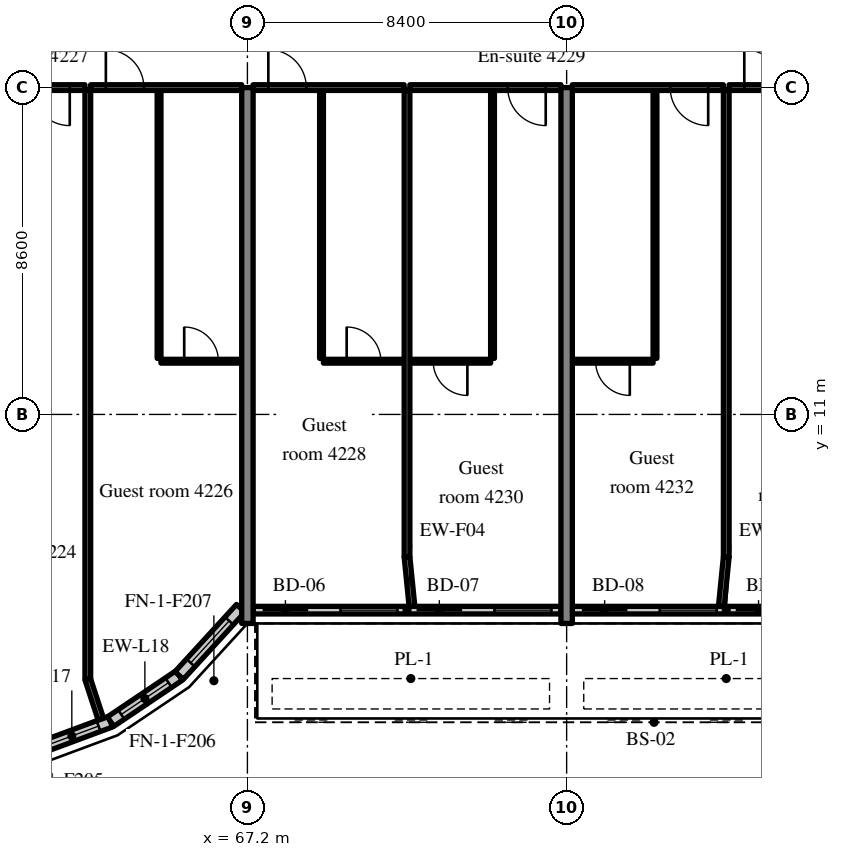
"""IFC4 building model, lengths in metres.
Left out: names, types, materials, properties, quantities, classifications, styles, units other than length and angle.
Written with IfcOpenShell. Run it as: python <this file> out.ifc"""

import sys

from ifc_helpers import new_model, si_unit, direction, frame, frame_2d, origin, place, context, subcontext, project, spatial, rectangle, extrude, source, transform, mapped, element, fill, save


model = new_model("IFC4")
c1 = context("Model", 3, precision=1e-05, world=origin(), true_north=direction((0.0, 1.0)))
c2 = subcontext(c1, "Body", "Model", "MODEL_VIEW")
j1 = project(units=[si_unit("LENGTHUNIT", "METRE"), si_unit("PLANEANGLEUNIT", "RADIAN")], contexts=[c1])
p1 = place(None, origin())
s1 = spatial("IfcSite", under=j1, at=p1, CompositionType="ELEMENT")
p2 = place(p1, origin())
s2 = spatial("IfcBuilding", under=s1, at=p2, CompositionType="ELEMENT")
p3 = place(p2, frame((0.0, 0.0, 174.4)))
s3 = spatial("IfcBuildingStorey", under=s2, at=p3, CompositionType="ELEMENT", Elevation=174.4)
m1 = source(origin(), c2, "Body", "SweptSolid", [
    extrude(rectangle(XDim=14.1, YDim=0.3, at=frame_2d((7.05, 0.0))), origin(), (0.0, 0.0, 1.0), 3.52),
])
for number, where, z_axis, x_axis in (
    (1, (67.2, 5.5, 0.0), (0.0, 0.0, 1.0), (0.0, 1.0, 0.0)),
    (2, (75.6, 5.5, 0.0), (0.0, 0.0, 1.0), (0.0, 1.0, 0.0)),
):
    element("IfcWall", number, at=place(p3, frame(where, z_axis=z_axis, x_axis=x_axis)), inside=s3, PredefinedType="SHEAR", context=c2, shape_type="MappedRepresentation", body=[
        mapped(m1, transform((0.0, 0.0, 0.0), scale=1.0)),
    ])
m2 = source(origin(), c2, "Body", "SweptSolid", [
    extrude(rectangle(XDim=2.176, YDim=0.3, at=frame_2d((1.088, 0.0))), origin(), (0.0, 0.0, 1.0), 3.52),
])
p4 = place(p3, frame((61.56, 2.16, 0.0), z_axis=(0.0, 0.0, 1.0), x_axis=(0.937531979054, 0.347899106424, 0.0)))
e3 = element("IfcWall", 3, at=p4, inside=s3, PredefinedType="SOLIDWALL", context=c2, shape_type="MappedRepresentation", body=[
    mapped(m2, transform((0.0, 0.0, 0.0), scale=1.0)),
])
m3 = source(origin(), c2, "Body", "SweptSolid", [
    extrude(rectangle(XDim=1.5, YDim=2.0, at=frame_2d((0.75, 1.0))), frame((0.0, 0.16, 0.0), z_axis=(0.0, -1.0, 0.0), x_axis=(1.0, 0.0, 0.0)), (0.0, 0.0, 1.0), 0.32),
])
p5 = place(p4, frame((0.338, 0.0, 0.9)))
e4 = element("IfcOpeningElement", 4, at=p5, cuts=e3, PredefinedType="OPENING", context=c2, shape_type="MappedRepresentation", body=[
    mapped(m3, transform((0.0, 0.0, 0.0), scale=1.0)),
])
m4 = source(origin(), c2, "Body", "SweptSolid", [
    extrude(rectangle(XDim=2.176, YDim=0.3, at=frame_2d((1.088, 0.0))), origin(), (0.0, 0.0, 1.0), 3.52),
])
p6 = place(p3, frame((63.599, 2.917, 0.0), z_axis=(0.0, 0.0, 1.0), x_axis=(0.829625727223, 0.558319937607, 0.0)))
e5 = element("IfcWall", 5, at=p6, inside=s3, PredefinedType="SOLIDWALL", context=c2, shape_type="MappedRepresentation", body=[
    mapped(m4, transform((0.0, 0.0, 0.0), scale=1.0)),
])
p7 = place(p6, frame((0.338, 0.0, 0.9)))
e6 = element("IfcOpeningElement", 6, at=p7, cuts=e5, PredefinedType="OPENING", context=c2, shape_type="MappedRepresentation", body=[
    mapped(m3, transform((0.0, 0.0, 0.0), scale=1.0)),
])
m5 = source(origin(), c2, "Body", "SweptSolid", [
    extrude(rectangle(XDim=2.398, YDim=0.3, at=frame_2d((1.199, 0.0))), origin(), (0.0, 0.0, 1.0), 3.52),
])
p8 = place(p3, frame((65.404, 4.131, 0.0), z_axis=(0.0, 0.0, 1.0), x_axis=(0.675374189419, 0.737475222815, 0.0)))
e7 = element("IfcWall", 7, at=p8, inside=s3, PredefinedType="SOLIDWALL", context=c2, shape_type="MappedRepresentation", body=[
    mapped(m5, transform((0.0, 0.0, 0.0), scale=1.0)),
])
p9 = place(p8, frame((0.449, 0.0, 0.9)))
e8 = element("IfcOpeningElement", 8, at=p9, cuts=e7, PredefinedType="OPENING", context=c2, shape_type="MappedRepresentation", body=[
    mapped(m3, transform((0.0, 0.0, 0.0), scale=1.0)),
])
m6 = source(origin(), c2, "Body", "SweptSolid", [
    extrude(rectangle(XDim=8.1, YDim=0.2, at=frame_2d((4.05, 0.0))), origin(), (0.0, 0.0, 1.0), 2.87),
])
p10 = place(p3, frame((67.35, 5.85, 0.0), z_axis=(0.0, 0.0, 1.0), x_axis=(1.0, 0.0, 0.0)))
e9 = element("IfcWall", 9, at=p10, inside=s3, PredefinedType="SOLIDWALL", context=c2, shape_type="MappedRepresentation", body=[
    mapped(m6, transform((0.0, 0.0, 0.0), scale=1.0)),
])
m7 = source(origin(), c2, "Body", "SweptSolid", [
    extrude(rectangle(XDim=1.2, YDim=2.4, at=frame_2d((0.6, 1.2))), frame((0.0, 0.11, 0.0), z_axis=(0.0, -1.0, 0.0), x_axis=(1.0, 0.0, 0.0)), (0.0, 0.0, 1.0), 0.22),
])
p11 = place(p10, frame((0.25, 0.0, 0.0)))
e10 = element("IfcOpeningElement", 10, at=p11, cuts=e9, PredefinedType="OPENING", context=c2, shape_type="MappedRepresentation", body=[
    mapped(m7, transform((0.0, 0.0, 0.0), scale=1.0)),
])
m8 = source(origin(), c2, "Body", "SweptSolid", [
    extrude(rectangle(XDim=1.5, YDim=1.5, at=frame_2d((0.75, 0.75))), frame((0.0, 0.11, 0.0), z_axis=(0.0, -1.0, 0.0), x_axis=(1.0, 0.0, 0.0)), (0.0, 0.0, 1.0), 0.22),
])
p12 = place(p10, frame((2.3, 0.0, 0.9)))
e11 = element("IfcOpeningElement", 11, at=p12, cuts=e9, PredefinedType="OPENING", context=c2, shape_type="MappedRepresentation", body=[
    mapped(m8, transform((0.0, 0.0, 0.0), scale=1.0)),
])
p13 = place(p10, frame((4.3, 0.0, 0.0)))
e12 = element("IfcOpeningElement", 12, at=p13, cuts=e9, PredefinedType="OPENING", context=c2, shape_type="MappedRepresentation", body=[
    mapped(m7, transform((0.0, 0.0, 0.0), scale=1.0)),
])
p14 = place(p10, frame((6.35, 0.0, 0.9)))
e13 = element("IfcOpeningElement", 13, at=p14, cuts=e9, PredefinedType="OPENING", context=c2, shape_type="MappedRepresentation", body=[
    mapped(m8, transform((0.0, 0.0, 0.0), scale=1.0)),
])
m9 = source(origin(), c2, "Body", "SweptSolid", [
    extrude(rectangle(XDim=8.1, YDim=0.2, at=frame_2d((4.05, 0.0))), origin(), (0.0, 0.0, 1.0), 2.87),
])
p15 = place(p3, frame((75.75, 5.85, 0.0), z_axis=(0.0, 0.0, 1.0), x_axis=(1.0, 0.0, 0.0)))
e14 = element("IfcWall", 14, at=p15, inside=s3, PredefinedType="SOLIDWALL", context=c2, shape_type="MappedRepresentation", body=[
    mapped(m9, transform((0.0, 0.0, 0.0), scale=1.0)),
])
p16 = place(p15, frame((0.25, 0.0, 0.0)))
e15 = element("IfcOpeningElement", 15, at=p16, cuts=e14, PredefinedType="OPENING", context=c2, shape_type="MappedRepresentation", body=[
    mapped(m7, transform((0.0, 0.0, 0.0), scale=1.0)),
])
p17 = place(p15, frame((2.3, 0.0, 0.9)))
e16 = element("IfcOpeningElement", 16, at=p17, cuts=e14, PredefinedType="OPENING", context=c2, shape_type="MappedRepresentation", body=[
    mapped(m8, transform((0.0, 0.0, 0.0), scale=1.0)),
])
p18 = place(p15, frame((4.3, 0.0, 0.0)))
e17 = element("IfcOpeningElement", 17, at=p18, cuts=e14, PredefinedType="OPENING", context=c2, shape_type="MappedRepresentation", body=[
    mapped(m7, transform((0.0, 0.0, 0.0), scale=1.0)),
])
p19 = place(p15, frame((6.35, 0.0, 0.9)))
e18 = element("IfcOpeningElement", 18, at=p19, cuts=e14, PredefinedType="OPENING", context=c2, shape_type="MappedRepresentation", body=[
    mapped(m8, transform((0.0, 0.0, 0.0), scale=1.0)),
])
m10 = source(origin(), c2, "Body", "SweptSolid", [
    extrude(rectangle(XDim=3.975, YDim=0.15, at=frame_2d((1.988, 0.0))), origin(), (0.0, 0.0, 1.0), 2.82),
])
p20 = place(p3, frame((58.95, 19.6, 0.0), z_axis=(0.0, 0.0, 1.0), x_axis=(1.0, 0.0, 0.0)))
e19 = element("IfcWall", 19, at=p20, inside=s3, PredefinedType="PARTITIONING", context=c2, shape_type="MappedRepresentation", body=[
    mapped(m10, transform((0.0, 0.0, 0.0), scale=1.0)),
])
m11 = source(origin(), c2, "Body", "SweptSolid", [
    extrude(rectangle(XDim=1.0, YDim=2.1, at=frame_2d((0.5, 1.05))), frame((0.0, 0.085, 0.0), z_axis=(0.0, -1.0, 0.0), x_axis=(1.0, 0.0, 0.0)), (0.0, 0.0, 1.0), 0.17),
])
p21 = place(p20, frame((2.575, 0.0, 0.0)))
e20 = element("IfcOpeningElement", 20, at=p21, cuts=e19, PredefinedType="OPENING", context=c2, shape_type="MappedRepresentation", body=[
    mapped(m11, transform((0.0, 0.0, 0.0), scale=1.0)),
])
m12 = source(origin(), c2, "Body", "SweptSolid", [
    extrude(rectangle(XDim=7.05, YDim=0.1, at=frame_2d((3.525, 0.0))), origin(), (0.0, 0.0, 1.0), 3.52),
])
p22 = place(p3, frame((64.875, 12.475, 0.0), z_axis=(0.0, 0.0, 1.0), x_axis=(0.0, 1.0, 0.0)))
e21 = element("IfcWall", 21, at=p22, inside=s3, PredefinedType="PARTITIONING", context=c2, shape_type="MappedRepresentation", body=[
    mapped(m12, transform((0.0, 0.0, 0.0), scale=1.0)),
])
m13 = source(origin(), c2, "Body", "SweptSolid", [
    extrude(rectangle(XDim=2.125, YDim=0.1, at=frame_2d((1.062, 0.0))), origin(), (0.0, 0.0, 1.0), 3.52),
])
p23 = place(p3, frame((64.925, 12.4, 0.0), z_axis=(0.0, 0.0, 1.0), x_axis=(1.0, 0.0, 0.0)))
e22 = element("IfcWall", 22, at=p23, inside=s3, PredefinedType="PARTITIONING", context=c2, shape_type="MappedRepresentation", body=[
    mapped(m13, transform((0.0, 0.0, 0.0), scale=1.0)),
])
m14 = source(origin(), c2, "Body", "SweptSolid", [
    extrude(rectangle(XDim=0.9, YDim=2.1, at=frame_2d((0.45, 1.05))), frame((0.0, 0.06, 0.0), z_axis=(0.0, -1.0, 0.0), x_axis=(1.0, 0.0, 0.0)), (0.0, 0.0, 1.0), 0.12),
])
p24 = place(p23, frame((0.612, 0.0, 0.0)))
e23 = element("IfcOpeningElement", 23, at=p24, cuts=e22, PredefinedType="OPENING", context=c2, shape_type="MappedRepresentation", body=[
    mapped(m14, transform((0.0, 0.0, 0.0), scale=1.0)),
])
p25 = place(p3, frame((63.075, 19.6, 0.0), z_axis=(0.0, 0.0, 1.0), x_axis=(1.0, 0.0, 0.0)))
e24 = element("IfcWall", 24, at=p25, inside=s3, PredefinedType="PARTITIONING", context=c2, shape_type="MappedRepresentation", body=[
    mapped(m10, transform((0.0, 0.0, 0.0), scale=1.0)),
])
p26 = place(p25, frame((0.4, 0.0, 0.0)))
e25 = element("IfcOpeningElement", 25, at=p26, cuts=e24, PredefinedType="OPENING", context=c2, shape_type="MappedRepresentation", body=[
    mapped(m11, transform((0.0, 0.0, 0.0), scale=1.0)),
])
m15 = source(origin(), c2, "Body", "SweptSolid", [
    extrude(rectangle(XDim=15.498, YDim=0.15, at=frame_2d((7.749, 0.0))), origin(), (0.0, 0.0, 1.0), 3.52),
])
p27 = place(p3, frame((63.0, 4.027, 0.0), z_axis=(0.0, 0.0, 1.0), x_axis=(0.0, 1.0, 0.0)))
e26 = element("IfcWall", 26, at=p27, inside=s3, PredefinedType="PARTITIONING", context=c2, shape_type="MappedRepresentation", body=[
    mapped(m15, transform((0.0, 0.0, 0.0), scale=1.0)),
])
p28 = place(p3, frame((69.15, 12.475, 0.0), z_axis=(0.0, 0.0, 1.0), x_axis=(0.0, 1.0, 0.0)))
e27 = element("IfcWall", 27, at=p28, inside=s3, PredefinedType="PARTITIONING", context=c2, shape_type="MappedRepresentation", body=[
    mapped(m12, transform((0.0, 0.0, 0.0), scale=1.0)),
])
p29 = place(p3, frame((69.2, 12.4, 0.0), z_axis=(0.0, 0.0, 1.0), x_axis=(1.0, 0.0, 0.0)))
e28 = element("IfcWall", 28, at=p29, inside=s3, PredefinedType="PARTITIONING", context=c2, shape_type="MappedRepresentation", body=[
    mapped(m13, transform((0.0, 0.0, 0.0), scale=1.0)),
])
p30 = place(p29, frame((0.612, 0.0, 0.0)))
e29 = element("IfcOpeningElement", 29, at=p30, cuts=e28, PredefinedType="OPENING", context=c2, shape_type="MappedRepresentation", body=[
    mapped(m14, transform((0.0, 0.0, 0.0), scale=1.0)),
])
m16 = source(origin(), c2, "Body", "SweptSolid", [
    extrude(rectangle(XDim=3.975, YDim=0.15, at=frame_2d((1.987, 0.0))), origin(), (0.0, 0.0, 1.0), 2.82),
])
p31 = place(p3, frame((67.35, 19.6, 0.0), z_axis=(0.0, 0.0, 1.0), x_axis=(1.0, 0.0, 0.0)))
e30 = element("IfcWall", 30, at=p31, inside=s3, PredefinedType="PARTITIONING", context=c2, shape_type="MappedRepresentation", body=[
    mapped(m16, transform((0.0, 0.0, 0.0), scale=1.0)),
])
p32 = place(p31, frame((0.4, 0.0, 0.0)))
e31 = element("IfcOpeningElement", 31, at=p32, cuts=e30, PredefinedType="OPENING", context=c2, shape_type="MappedRepresentation", body=[
    mapped(m11, transform((0.0, 0.0, 0.0), scale=1.0)),
])
p33 = place(p3, frame((73.65, 12.475, 0.0), z_axis=(0.0, 0.0, 1.0), x_axis=(0.0, 1.0, 0.0)))
e32 = element("IfcWall", 32, at=p33, inside=s3, PredefinedType="PARTITIONING", context=c2, shape_type="MappedRepresentation", body=[
    mapped(m12, transform((0.0, 0.0, 0.0), scale=1.0)),
])
p34 = place(p3, frame((71.475, 12.4, 0.0), z_axis=(0.0, 0.0, 1.0), x_axis=(1.0, 0.0, 0.0)))
e33 = element("IfcWall", 33, at=p34, inside=s3, PredefinedType="PARTITIONING", context=c2, shape_type="MappedRepresentation", body=[
    mapped(m13, transform((0.0, 0.0, 0.0), scale=1.0)),
])
p35 = place(p34, frame((0.613, 0.0, 0.0)))
e34 = element("IfcOpeningElement", 34, at=p35, cuts=e33, PredefinedType="OPENING", context=c2, shape_type="MappedRepresentation", body=[
    mapped(m14, transform((0.0, 0.0, 0.0), scale=1.0)),
])
p36 = place(p3, frame((71.475, 19.6, 0.0), z_axis=(0.0, 0.0, 1.0), x_axis=(1.0, 0.0, 0.0)))
e35 = element("IfcWall", 35, at=p36, inside=s3, PredefinedType="PARTITIONING", context=c2, shape_type="MappedRepresentation", body=[
    mapped(m16, transform((0.0, 0.0, 0.0), scale=1.0)),
])
p37 = place(p36, frame((2.575, 0.0, 0.0)))
e36 = element("IfcOpeningElement", 36, at=p37, cuts=e35, PredefinedType="OPENING", context=c2, shape_type="MappedRepresentation", body=[
    mapped(m11, transform((0.0, 0.0, 0.0), scale=1.0)),
])
m17 = source(origin(), c2, "Body", "SweptSolid", [
    extrude(rectangle(XDim=12.275, YDim=0.15, at=frame_2d((6.137, 0.0))), origin(), (0.0, 0.0, 1.0), 3.52),
])
p38 = place(p3, frame((71.4, 7.25, 0.0), z_axis=(0.0, 0.0, 1.0), x_axis=(0.0, 1.0, 0.0)))
e37 = element("IfcWall", 37, at=p38, inside=s3, PredefinedType="PARTITIONING", context=c2, shape_type="MappedRepresentation", body=[
    mapped(m17, transform((0.0, 0.0, 0.0), scale=1.0)),
])
p39 = place(p3, frame((77.925, 12.475, 0.0), z_axis=(0.0, 0.0, 1.0), x_axis=(0.0, 1.0, 0.0)))
e38 = element("IfcWall", 38, at=p39, inside=s3, PredefinedType="PARTITIONING", context=c2, shape_type="MappedRepresentation", body=[
    mapped(m12, transform((0.0, 0.0, 0.0), scale=1.0)),
])
p40 = place(p3, frame((75.75, 12.4, 0.0), z_axis=(0.0, 0.0, 1.0), x_axis=(1.0, 0.0, 0.0)))
e39 = element("IfcWall", 39, at=p40, inside=s3, PredefinedType="PARTITIONING", context=c2, shape_type="MappedRepresentation", body=[
    mapped(m13, transform((0.0, 0.0, 0.0), scale=1.0)),
])
p41 = place(p40, frame((0.612, 0.0, 0.0)))
e40 = element("IfcOpeningElement", 40, at=p41, cuts=e39, PredefinedType="OPENING", context=c2, shape_type="MappedRepresentation", body=[
    mapped(m14, transform((0.0, 0.0, 0.0), scale=1.0)),
])
p42 = place(p3, frame((75.75, 19.6, 0.0), z_axis=(0.0, 0.0, 1.0), x_axis=(1.0, 0.0, 0.0)))
e41 = element("IfcWall", 41, at=p42, inside=s3, PredefinedType="PARTITIONING", context=c2, shape_type="MappedRepresentation", body=[
    mapped(m10, transform((0.0, 0.0, 0.0), scale=1.0)),
])
p43 = place(p42, frame((2.575, 0.0, 0.0)))
e42 = element("IfcOpeningElement", 42, at=p43, cuts=e41, PredefinedType="OPENING", context=c2, shape_type="MappedRepresentation", body=[
    mapped(m11, transform((0.0, 0.0, 0.0), scale=1.0)),
])
p44 = place(p3, frame((79.875, 19.6, 0.0), z_axis=(0.0, 0.0, 1.0), x_axis=(1.0, 0.0, 0.0)))
e43 = element("IfcWall", 43, at=p44, inside=s3, PredefinedType="PARTITIONING", context=c2, shape_type="MappedRepresentation", body=[
    mapped(m10, transform((0.0, 0.0, 0.0), scale=1.0)),
])
p45 = place(p44, frame((0.4, 0.0, 0.0)))
e44 = element("IfcOpeningElement", 44, at=p45, cuts=e43, PredefinedType="OPENING", context=c2, shape_type="MappedRepresentation", body=[
    mapped(m11, transform((0.0, 0.0, 0.0), scale=1.0)),
])
p46 = place(p3, frame((79.8, 7.25, 0.0), z_axis=(0.0, 0.0, 1.0), x_axis=(0.0, 1.0, 0.0)))
e45 = element("IfcWall", 45, at=p46, inside=s3, PredefinedType="PARTITIONING", context=c2, shape_type="MappedRepresentation", body=[
    mapped(m17, transform((0.0, 0.0, 0.0), scale=1.0)),
])
m18 = source(origin(), c2, "Body", "SweptSolid", [
    extrude(rectangle(XDim=1.101, YDim=0.15, at=frame_2d((0.55, 0.0))), origin(), (0.0, 0.0, 1.0), 3.52),
])
p47 = place(p3, frame((63.343, 2.981, 0.0), z_axis=(0.0, 0.0, 1.0), x_axis=(-0.311567081539, 0.950224159712, 0.0)))
e46 = element("IfcWall", 46, at=p47, inside=s3, PredefinedType="PARTITIONING", context=c2, shape_type="MappedRepresentation", body=[
    mapped(m18, transform((0.0, 0.0, 0.0), scale=1.0)),
])
m19 = source(origin(), c2, "Body", "SweptSolid", [
    extrude(rectangle(XDim=1.307, YDim=0.15, at=frame_2d((0.653, 0.0))), origin(), (0.0, 0.0, 1.0), 3.52),
])
for number, where, z_axis, x_axis in (
    (47, (71.53, 5.95, 0.0), (0.0, 0.0, 1.0), (-0.1, 0.995, 0.0)),
    (48, (79.67, 5.95, 0.0), (0.0, 0.0, 1.0), (0.1, 0.995, 0.0)),
):
    element("IfcWall", number, at=place(p3, frame(where, z_axis=z_axis, x_axis=x_axis)), inside=s3, PredefinedType="PARTITIONING", context=c2, shape_type="MappedRepresentation", body=[
        mapped(m19, transform((0.0, 0.0, 0.0), scale=1.0)),
    ])
m20 = source(origin(), c2, "Body", "SweptSolid", [
    extrude(rectangle(XDim=1.5, YDim=2.0, at=frame_2d((0.75, 1.0))), frame((0.0, 0.03, 0.0), z_axis=(0.0, -1.0, 0.0), x_axis=(1.0, 0.0, 0.0)), (0.0, 0.0, 1.0), 0.06),
])
p48 = place(p5, origin())
e49 = element("IfcWindow", 49, at=p48, inside=s3, PartitioningType="SINGLE_PANEL", PredefinedType="WINDOW", context=c2, shape_type="MappedRepresentation", body=[
    mapped(m20, transform((0.0, 0.0, 0.0), scale=1.0)),
])
fill(e4, e49)
p49 = place(p7, origin())
e50 = element("IfcWindow", 50, at=p49, inside=s3, PartitioningType="SINGLE_PANEL", PredefinedType="WINDOW", context=c2, shape_type="MappedRepresentation", body=[
    mapped(m20, transform((0.0, 0.0, 0.0), scale=1.0)),
])
fill(e6, e50)
p50 = place(p9, origin())
e51 = element("IfcWindow", 51, at=p50, inside=s3, PartitioningType="SINGLE_PANEL", PredefinedType="WINDOW", context=c2, shape_type="MappedRepresentation", body=[
    mapped(m20, transform((0.0, 0.0, 0.0), scale=1.0)),
])
fill(e8, e51)
m21 = source(origin(), c2, "Body", "SweptSolid", [
    extrude(rectangle(XDim=1.2, YDim=2.4, at=frame_2d((0.6, 1.2))), frame((0.0, 0.025, 0.0), z_axis=(0.0, -1.0, 0.0), x_axis=(1.0, 0.0, 0.0)), (0.0, 0.0, 1.0), 0.05),
])
p51 = place(p11, origin())
e52 = element("IfcDoor", 52, at=p51, inside=s3, OperationType="SLIDING_TO_RIGHT", PredefinedType="DOOR", context=c2, shape_type="MappedRepresentation", body=[
    mapped(m21, transform((0.0, 0.0, 0.0), scale=1.0)),
])
fill(e10, e52)
m22 = source(origin(), c2, "Body", "SweptSolid", [
    extrude(rectangle(XDim=1.5, YDim=1.5, at=frame_2d((0.75, 0.75))), frame((0.0, 0.03, 0.0), z_axis=(0.0, -1.0, 0.0), x_axis=(1.0, 0.0, 0.0)), (0.0, 0.0, 1.0), 0.06),
])
p52 = place(p12, origin())
e53 = element("IfcWindow", 53, at=p52, inside=s3, PartitioningType="SINGLE_PANEL", PredefinedType="WINDOW", context=c2, shape_type="MappedRepresentation", body=[
    mapped(m22, transform((0.0, 0.0, 0.0), scale=1.0)),
])
fill(e11, e53)
p53 = place(p13, origin())
e54 = element("IfcDoor", 54, at=p53, inside=s3, OperationType="SLIDING_TO_LEFT", PredefinedType="DOOR", context=c2, shape_type="MappedRepresentation", body=[
    mapped(m21, transform((0.0, 0.0, 0.0), scale=1.0)),
])
fill(e12, e54)
p54 = place(p14, origin())
e55 = element("IfcWindow", 55, at=p54, inside=s3, PartitioningType="SINGLE_PANEL", PredefinedType="WINDOW", context=c2, shape_type="MappedRepresentation", body=[
    mapped(m22, transform((0.0, 0.0, 0.0), scale=1.0)),
])
fill(e13, e55)
p55 = place(p16, origin())
e56 = element("IfcDoor", 56, at=p55, inside=s3, OperationType="SLIDING_TO_RIGHT", PredefinedType="DOOR", context=c2, shape_type="MappedRepresentation", body=[
    mapped(m21, transform((0.0, 0.0, 0.0), scale=1.0)),
])
fill(e15, e56)
p56 = place(p17, origin())
e57 = element("IfcWindow", 57, at=p56, inside=s3, PartitioningType="SINGLE_PANEL", PredefinedType="WINDOW", context=c2, shape_type="MappedRepresentation", body=[
    mapped(m22, transform((0.0, 0.0, 0.0), scale=1.0)),
])
fill(e16, e57)
p57 = place(p18, origin())
e58 = element("IfcDoor", 58, at=p57, inside=s3, OperationType="SLIDING_TO_LEFT", PredefinedType="DOOR", context=c2, shape_type="MappedRepresentation", body=[
    mapped(m21, transform((0.0, 0.0, 0.0), scale=1.0)),
])
fill(e17, e58)
m23 = source(origin(), c2, "Body", "SweptSolid", [
    extrude(rectangle(XDim=1.0, YDim=2.1, at=frame_2d((0.5, 1.05))), frame((0.0, 0.025, 0.0), z_axis=(0.0, -1.0, 0.0), x_axis=(1.0, 0.0, 0.0)), (0.0, 0.0, 1.0), 0.05),
])
p58 = place(p21, origin())
e59 = element("IfcDoor", 59, at=p58, inside=s3, OperationType="SINGLE_SWING_RIGHT", PredefinedType="DOOR", context=c2, shape_type="MappedRepresentation", body=[
    mapped(m23, transform((0.0, 0.0, 0.0), scale=1.0)),
])
fill(e20, e59)
m24 = source(origin(), c2, "Body", "SweptSolid", [
    extrude(rectangle(XDim=0.9, YDim=2.1, at=frame_2d((0.45, 1.05))), frame((0.0, 0.025, 0.0), z_axis=(0.0, -1.0, 0.0), x_axis=(1.0, 0.0, 0.0)), (0.0, 0.0, 1.0), 0.05),
])
p59 = place(p24, origin())
e60 = element("IfcDoor", 60, at=p59, inside=s3, OperationType="SINGLE_SWING_LEFT", PredefinedType="DOOR", context=c2, shape_type="MappedRepresentation", body=[
    mapped(m24, transform((0.0, 0.0, 0.0), scale=1.0)),
])
fill(e23, e60)
p60 = place(p26, origin())
e61 = element("IfcDoor", 61, at=p60, inside=s3, OperationType="SINGLE_SWING_LEFT", PredefinedType="DOOR", context=c2, shape_type="MappedRepresentation", body=[
    mapped(m23, transform((0.0, 0.0, 0.0), scale=1.0)),
])
fill(e25, e61)
p61 = place(p30, origin())
e62 = element("IfcDoor", 62, at=p61, inside=s3, OperationType="SINGLE_SWING_LEFT", PredefinedType="DOOR", context=c2, shape_type="MappedRepresentation", body=[
    mapped(m24, transform((0.0, 0.0, 0.0), scale=1.0)),
])
fill(e29, e62)
p62 = place(p32, origin())
e63 = element("IfcDoor", 63, at=p62, inside=s3, OperationType="SINGLE_SWING_LEFT", PredefinedType="DOOR", context=c2, shape_type="MappedRepresentation", body=[
    mapped(m23, transform((0.0, 0.0, 0.0), scale=1.0)),
])
fill(e31, e63)
p63 = place(p35, origin())
e64 = element("IfcDoor", 64, at=p63, inside=s3, OperationType="SINGLE_SWING_RIGHT", PredefinedType="DOOR", context=c2, shape_type="MappedRepresentation", body=[
    mapped(m24, transform((0.0, 0.0, 0.0), scale=1.0)),
])
fill(e34, e64)
p64 = place(p37, origin())
e65 = element("IfcDoor", 65, at=p64, inside=s3, OperationType="SINGLE_SWING_RIGHT", PredefinedType="DOOR", context=c2, shape_type="MappedRepresentation", body=[
    mapped(m23, transform((0.0, 0.0, 0.0), scale=1.0)),
])
fill(e36, e65)
p65 = place(p41, origin())
e66 = element("IfcDoor", 66, at=p65, inside=s3, OperationType="SINGLE_SWING_RIGHT", PredefinedType="DOOR", context=c2, shape_type="MappedRepresentation", body=[
    mapped(m24, transform((0.0, 0.0, 0.0), scale=1.0)),
])
fill(e40, e66)
p66 = place(p43, origin())
e67 = element("IfcDoor", 67, at=p66, inside=s3, OperationType="SINGLE_SWING_RIGHT", PredefinedType="DOOR", context=c2, shape_type="MappedRepresentation", body=[
    mapped(m23, transform((0.0, 0.0, 0.0), scale=1.0)),
])
fill(e42, e67)
p67 = place(p45, origin())
e68 = element("IfcDoor", 68, at=p67, inside=s3, OperationType="SINGLE_SWING_LEFT", PredefinedType="DOOR", context=c2, shape_type="MappedRepresentation", body=[
    mapped(m23, transform((0.0, 0.0, 0.0), scale=1.0)),
])
fill(e44, e68)
save(model, sys.argv[1])
